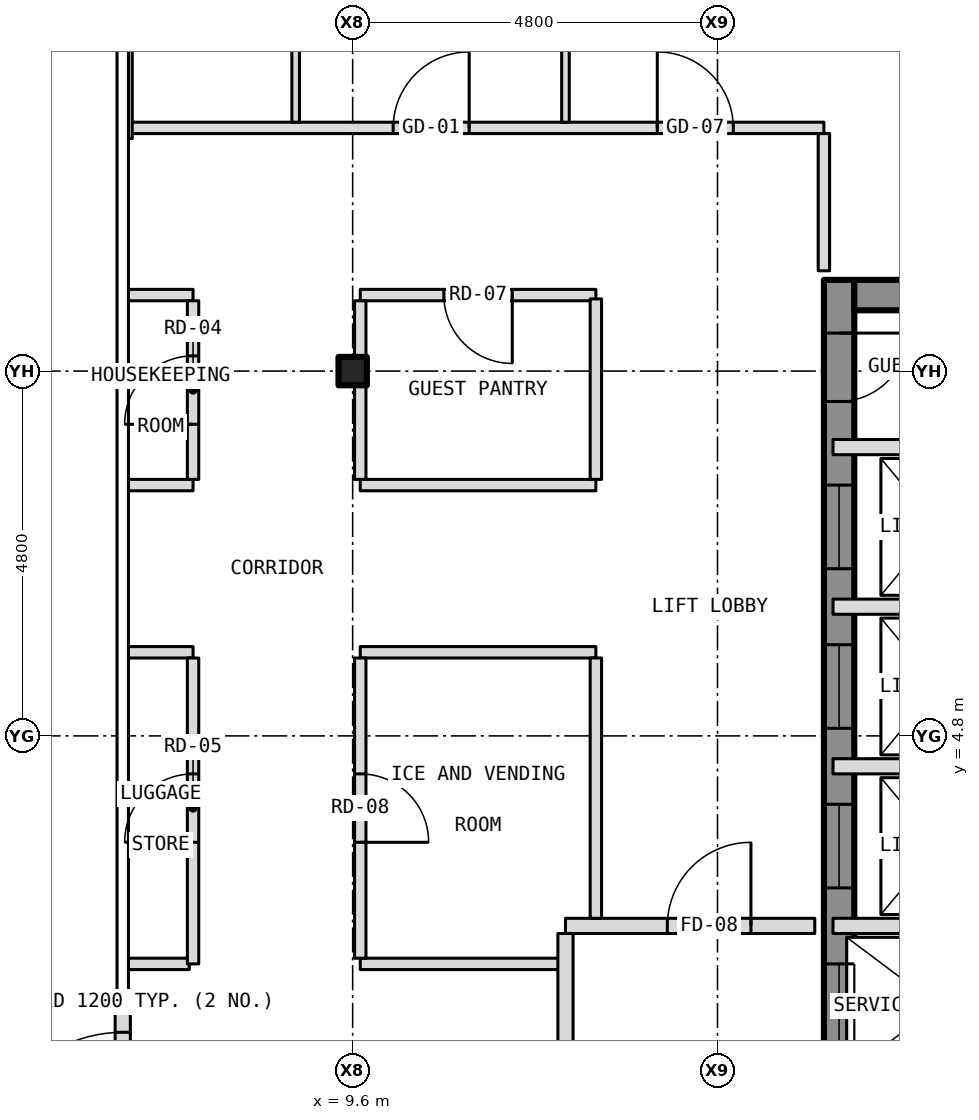
"""IFC4 building model, lengths in metres.
Left out: names, types, materials, properties, quantities, classifications, styles, units other than length and angle.
Written with IfcOpenShell. Run it as: python <this file> out.ifc"""

import sys

from ifc_helpers import new_model, si_unit, direction, frame, frame_2d, origin, origin_2d, place, context, subcontext, project, spatial, rectangle, i_section, extrude, element, fill, save


model = new_model("IFC4")
c1 = context("Model", 3, precision=1e-05, world=origin(), true_north=direction((0.0, 1.0)))
c2 = subcontext(c1, "Body", "Model", "MODEL_VIEW")
j1 = project(units=[si_unit("LENGTHUNIT", "METRE"), si_unit("PLANEANGLEUNIT", "RADIAN")], contexts=[c1])
p1 = place(None, origin())
s1 = spatial("IfcSite", under=j1, at=p1, CompositionType="ELEMENT")
p2 = place(p1, origin())
s2 = spatial("IfcBuilding", under=s1, at=p2, CompositionType="ELEMENT")
p3 = place(p2, frame((0.0, 0.0, 233.0)))
s3 = spatial("IfcBuildingStorey", under=s2, at=p3, CompositionType="ELEMENT", Elevation=233.0)
p4 = place(p3, frame((9.6, 9.6, -0.15), z_axis=(0.0, 0.0, 1.0), x_axis=(1.0, 0.0, 0.0)))
e1 = element("IfcColumn", 1, at=p4, inside=s3, PredefinedType="COLUMN", context=c2, shape_type="SweptSolid", body=[
    extrude(i_section(OverallWidth=0.373, OverallDepth=0.373, WebThickness=0.016, FlangeThickness=0.026, at=origin_2d()), origin(), (0.0, 0.0, 1.0), 3.35),
])
p5 = place(p3, frame((16.0, -10.8, 0.0), z_axis=(0.0, 0.0, 1.0), x_axis=(0.0, 1.0, 0.0)))
e2 = element("IfcWall", 2, at=p5, inside=s3, PredefinedType="SHEAR", context=c2, shape_type="SweptSolid", body=[
    extrude(rectangle(XDim=21.6, YDim=0.4, at=frame_2d((10.8, 0.0))), origin(), (0.0, 0.0, 1.0), 2.9),
])
p6 = place(p5, frame((9.4, 0.0, 0.0)))
e3 = element("IfcOpeningElement", 3, at=p6, cuts=e2, PredefinedType="OPENING", context=c2, shape_type="SweptSolid", body=[
    extrude(rectangle(XDim=1.1, YDim=2.1, at=frame_2d((0.55, 1.05))), frame((0.0, 0.212, 0.0), z_axis=(0.0, -1.0, 0.0), x_axis=(1.0, 0.0, 0.0)), (0.0, 0.0, 1.0), 0.424),
])
p7 = place(p5, frame((11.5, 0.0, 0.0)))
e4 = element("IfcOpeningElement", 4, at=p7, cuts=e2, PredefinedType="OPENING", context=c2, shape_type="SweptSolid", body=[
    extrude(rectangle(XDim=1.1, YDim=2.1, at=frame_2d((0.55, 1.05))), frame((0.0, 0.212, 0.0), z_axis=(0.0, -1.0, 0.0), x_axis=(1.0, 0.0, 0.0)), (0.0, 0.0, 1.0), 0.424),
])
p8 = place(p5, frame((13.6, 0.0, 0.0)))
e5 = element("IfcOpeningElement", 5, at=p8, cuts=e2, PredefinedType="OPENING", context=c2, shape_type="SweptSolid", body=[
    extrude(rectangle(XDim=1.1, YDim=2.1, at=frame_2d((0.55, 1.05))), frame((0.0, 0.212, 0.0), z_axis=(0.0, -1.0, 0.0), x_axis=(1.0, 0.0, 0.0)), (0.0, 0.0, 1.0), 0.424),
])
p9 = place(p5, frame((15.7, 0.0, 0.0)))
e6 = element("IfcOpeningElement", 6, at=p9, cuts=e2, PredefinedType="OPENING", context=c2, shape_type="SweptSolid", body=[
    extrude(rectangle(XDim=1.1, YDim=2.1, at=frame_2d((0.55, 1.05))), frame((0.0, 0.212, 0.0), z_axis=(0.0, -1.0, 0.0), x_axis=(1.0, 0.0, 0.0)), (0.0, 0.0, 1.0), 0.424),
])
p10 = place(p5, frame((17.8, 0.0, 0.0)))
e7 = element("IfcOpeningElement", 7, at=p10, cuts=e2, PredefinedType="OPENING", context=c2, shape_type="SweptSolid", body=[
    extrude(rectangle(XDim=1.1, YDim=2.1, at=frame_2d((0.55, 1.05))), frame((0.0, 0.212, 0.0), z_axis=(0.0, -1.0, 0.0), x_axis=(1.0, 0.0, 0.0)), (0.0, 0.0, 1.0), 0.424),
])
p11 = place(p5, frame((5.642, 0.0, 0.0)))
e8 = element("IfcOpeningElement", 8, at=p11, cuts=e2, PredefinedType="OPENING", context=c2, shape_type="SweptSolid", body=[
    extrude(rectangle(XDim=1.1, YDim=2.1, at=frame_2d((0.55, 1.05))), frame((0.0, 0.212, 0.0), z_axis=(0.0, -1.0, 0.0), x_axis=(1.0, 0.0, 0.0)), (0.0, 0.0, 1.0), 0.424),
])
p12 = place(p5, frame((7.5, 0.0, 0.0)))
e9 = element("IfcOpeningElement", 9, at=p12, cuts=e2, PredefinedType="OPENING", context=c2, shape_type="SweptSolid", body=[
    extrude(rectangle(XDim=1.1, YDim=2.1, at=frame_2d((0.55, 1.05))), frame((0.0, 0.212, 0.0), z_axis=(0.0, -1.0, 0.0), x_axis=(1.0, 0.0, 0.0)), (0.0, 0.0, 1.0), 0.424),
])
p13 = place(p5, frame((20.0, 0.0, 0.0)))
e10 = element("IfcOpeningElement", 10, at=p13, cuts=e2, PredefinedType="OPENING", context=c2, shape_type="SweptSolid", body=[
    extrude(rectangle(XDim=0.9, YDim=2.1, at=frame_2d((0.45, 1.05))), frame((0.0, 0.212, 0.0), z_axis=(0.0, -1.0, 0.0), x_axis=(1.0, 0.0, 0.0)), (0.0, 0.0, 1.0), 0.424),
])
p14 = place(p3, frame((16.2, 10.6, 0.0), z_axis=(0.0, 0.0, 1.0), x_axis=(1.0, 0.0, 0.0)))
e11 = element("IfcWall", 11, at=p14, inside=s3, PredefinedType="SHEAR", context=c2, shape_type="SweptSolid", body=[
    extrude(rectangle(XDim=3.8, YDim=0.4, at=frame_2d((1.9, 0.0))), origin(), (0.0, 0.0, 1.0), 2.9),
])
p15 = place(p3, frame((6.575, -1.4, 0.0), z_axis=(0.0, 0.0, 1.0), x_axis=(0.0, 1.0, 0.0)))
e12 = element("IfcWall", 12, at=p15, inside=s3, PredefinedType="SOLIDWALL", context=c2, shape_type="SweptSolid", body=[
    extrude(rectangle(XDim=2.8, YDim=0.2, at=frame_2d((1.4, 0.0))), origin(), (0.0, 0.0, 1.0), 3.5),
])
p16 = place(p15, frame((0.5, 0.0, 0.0)))
e13 = element("IfcOpeningElement", 13, at=p16, cuts=e12, PredefinedType="OPENING", context=c2, shape_type="SweptSolid", body=[
    extrude(rectangle(XDim=1.8, YDim=2.1, at=frame_2d((0.9, 1.05))), frame((0.0, 0.112, 0.0), z_axis=(0.0, -1.0, 0.0), x_axis=(1.0, 0.0, 0.0)), (0.0, 0.0, 1.0), 0.224),
])
p17 = place(p3, frame((6.62, 1.8, 0.0), z_axis=(0.0, 0.0, 1.0), x_axis=(1.0, 0.0, 0.0)))
e14 = element("IfcWall", 14, at=p17, inside=s3, PredefinedType="PARTITIONING", context=c2, shape_type="SweptSolid", body=[
    extrude(rectangle(XDim=0.83, YDim=0.15, at=frame_2d((0.415, 0.0))), origin(), (0.0, 0.0, 1.0), 3.2),
])
p18 = place(p3, frame((9.7, 1.8, 0.0), z_axis=(0.0, 0.0, 1.0), x_axis=(1.0, 0.0, 0.0)))
e15 = element("IfcWall", 15, at=p18, inside=s3, PredefinedType="PARTITIONING", context=c2, shape_type="SweptSolid", body=[
    extrude(rectangle(XDim=2.7, YDim=0.15, at=frame_2d((1.35, 0.0))), origin(), (0.0, 0.0, 1.0), 3.2),
])
p19 = place(p3, frame((12.4, 2.3, 0.0), z_axis=(0.0, 0.0, 1.0), x_axis=(1.0, 0.0, 0.0)))
e16 = element("IfcWall", 16, at=p19, inside=s3, PredefinedType="PARTITIONING", context=c2, shape_type="SweptSolid", body=[
    extrude(rectangle(XDim=3.28, YDim=0.2, at=frame_2d((1.64, 0.0))), origin(), (0.0, 0.0, 1.0), 3.2),
])
p20 = place(p19, frame((1.34, 0.0, 0.0)))
e17 = element("IfcOpeningElement", 17, at=p20, cuts=e16, PredefinedType="OPENING", context=c2, shape_type="SweptSolid", body=[
    extrude(rectangle(XDim=1.1, YDim=2.1, at=frame_2d((0.55, 1.05))), frame((0.0, 0.112, 0.0), z_axis=(0.0, -1.0, 0.0), x_axis=(1.0, 0.0, 0.0)), (0.0, 0.0, 1.0), 0.224),
])
for number, where, z_axis, x_axis in (
    (18, (15.92, 2.3, 0.0), (0.0, 0.0, 1.0), (1.0, 0.0, 0.0)),
    (19, (15.92, 4.4, 0.0), (0.0, 0.0, 1.0), (1.0, 0.0, 0.0)),
):
    element("IfcWall", number, at=place(p3, frame(where, z_axis=z_axis, x_axis=x_axis)), inside=s3, PredefinedType="PARTITIONING", context=c2, shape_type="SweptSolid", body=[
        extrude(rectangle(XDim=2.88, YDim=0.2, at=frame_2d((1.44, 0.0))), origin(), (0.0, 0.0, 1.0), 2.9),
    ])
p21 = place(p3, frame((6.62, 5.9, 0.0), z_axis=(0.0, 0.0, 1.0), x_axis=(1.0, 0.0, 0.0)))
e20 = element("IfcWall", 20, at=p21, inside=s3, PredefinedType="PARTITIONING", context=c2, shape_type="SweptSolid", body=[
    extrude(rectangle(XDim=0.88, YDim=0.15, at=frame_2d((0.44, 0.0))), origin(), (0.0, 0.0, 1.0), 3.2),
])
p22 = place(p3, frame((9.7, 5.9, 0.0), z_axis=(0.0, 0.0, 1.0), x_axis=(1.0, 0.0, 0.0)))
e21 = element("IfcWall", 21, at=p22, inside=s3, PredefinedType="PARTITIONING", context=c2, shape_type="SweptSolid", body=[
    extrude(rectangle(XDim=3.1, YDim=0.15, at=frame_2d((1.55, 0.0))), origin(), (0.0, 0.0, 1.0), 3.2),
])
p23 = place(p3, frame((15.92, 6.5, 0.0), z_axis=(0.0, 0.0, 1.0), x_axis=(1.0, 0.0, 0.0)))
e22 = element("IfcWall", 22, at=p23, inside=s3, PredefinedType="PARTITIONING", context=c2, shape_type="SweptSolid", body=[
    extrude(rectangle(XDim=2.88, YDim=0.2, at=frame_2d((1.44, 0.0))), origin(), (0.0, 0.0, 1.0), 2.9),
])
p24 = place(p3, frame((6.62, 8.1, 0.0), z_axis=(0.0, 0.0, 1.0), x_axis=(1.0, 0.0, 0.0)))
e23 = element("IfcWall", 23, at=p24, inside=s3, PredefinedType="PARTITIONING", context=c2, shape_type="SweptSolid", body=[
    extrude(rectangle(XDim=0.88, YDim=0.15, at=frame_2d((0.44, 0.0))), origin(), (0.0, 0.0, 1.0), 3.2),
])
p25 = place(p3, frame((9.7, 8.1, 0.0), z_axis=(0.0, 0.0, 1.0), x_axis=(1.0, 0.0, 0.0)))
e24 = element("IfcWall", 24, at=p25, inside=s3, PredefinedType="PARTITIONING", context=c2, shape_type="SweptSolid", body=[
    extrude(rectangle(XDim=3.1, YDim=0.15, at=frame_2d((1.55, 0.0))), origin(), (0.0, 0.0, 1.0), 3.2),
])
p26 = place(p3, frame((15.92, 8.6, 0.0), z_axis=(0.0, 0.0, 1.0), x_axis=(1.0, 0.0, 0.0)))
e25 = element("IfcWall", 25, at=p26, inside=s3, PredefinedType="PARTITIONING", context=c2, shape_type="SweptSolid", body=[
    extrude(rectangle(XDim=2.88, YDim=0.2, at=frame_2d((1.44, 0.0))), origin(), (0.0, 0.0, 1.0), 2.9),
])
p27 = place(p3, frame((6.62, 10.6, 0.0), z_axis=(0.0, 0.0, 1.0), x_axis=(1.0, 0.0, 0.0)))
e26 = element("IfcWall", 26, at=p27, inside=s3, PredefinedType="PARTITIONING", context=c2, shape_type="SweptSolid", body=[
    extrude(rectangle(XDim=0.88, YDim=0.15, at=frame_2d((0.44, 0.0))), origin(), (0.0, 0.0, 1.0), 3.2),
])
p28 = place(p3, frame((9.7, 10.6, 0.0), z_axis=(0.0, 0.0, 1.0), x_axis=(1.0, 0.0, 0.0)))
e27 = element("IfcWall", 27, at=p28, inside=s3, PredefinedType="PARTITIONING", context=c2, shape_type="SweptSolid", body=[
    extrude(rectangle(XDim=3.1, YDim=0.15, at=frame_2d((1.55, 0.0))), origin(), (0.0, 0.0, 1.0), 3.2),
])
p29 = place(p28, frame((1.1, 0.0, 0.0)))
e28 = element("IfcOpeningElement", 28, at=p29, cuts=e27, PredefinedType="OPENING", context=c2, shape_type="SweptSolid", body=[
    extrude(rectangle(XDim=0.9, YDim=2.1, at=frame_2d((0.45, 1.05))), frame((0.0, 0.087, 0.0), z_axis=(0.0, -1.0, 0.0), x_axis=(1.0, 0.0, 0.0)), (0.0, 0.0, 1.0), 0.174),
])
p30 = place(p3, frame((6.65, 12.8, 0.0), z_axis=(0.0, 0.0, 1.0), x_axis=(1.0, 0.0, 0.0)))
e29 = element("IfcWall", 29, at=p30, inside=s3, PredefinedType="PARTITIONING", context=c2, shape_type="SweptSolid", body=[
    extrude(rectangle(XDim=9.15, YDim=0.15, at=frame_2d((4.575, 0.0))), origin(), (0.0, 0.0, 1.0), 3.2),
])
p31 = place(p30, frame((3.483, 0.0, 0.0)))
e30 = element("IfcOpeningElement", 30, at=p31, cuts=e29, PredefinedType="OPENING", context=c2, shape_type="SweptSolid", body=[
    extrude(rectangle(XDim=1.0, YDim=2.1, at=frame_2d((0.5, 1.05))), frame((0.0, 0.087, 0.0), z_axis=(0.0, -1.0, 0.0), x_axis=(1.0, 0.0, 0.0)), (0.0, 0.0, 1.0), 0.174),
])
p32 = place(p30, frame((6.958, 0.0, 0.0)))
e31 = element("IfcOpeningElement", 31, at=p32, cuts=e29, PredefinedType="OPENING", context=c2, shape_type="SweptSolid", body=[
    extrude(rectangle(XDim=1.0, YDim=2.1, at=frame_2d((0.5, 1.05))), frame((0.0, 0.087, 0.0), z_axis=(0.0, -1.0, 0.0), x_axis=(1.0, 0.0, 0.0)), (0.0, 0.0, 1.0), 0.174),
])
p33 = place(p3, frame((6.65, 12.66, 0.0), z_axis=(0.0, 0.0, 1.0), x_axis=(0.0, 1.0, 0.0)))
e32 = element("IfcWall", 32, at=p33, inside=s3, PredefinedType="PARTITIONING", context=c2, shape_type="SweptSolid", body=[
    extrude(rectangle(XDim=3.48, YDim=0.1, at=frame_2d((1.74, 0.0))), origin(), (0.0, 0.0, 1.0), 3.2),
])
p34 = place(p3, frame((7.5, 1.8, 0.0), z_axis=(0.0, 0.0, 1.0), x_axis=(0.0, 1.0, 0.0)))
e33 = element("IfcWall", 33, at=p34, inside=s3, PredefinedType="PARTITIONING", context=c2, shape_type="SweptSolid", body=[
    extrude(rectangle(XDim=4.025, YDim=0.15, at=frame_2d((2.012, 0.0))), origin(), (0.0, 0.0, 1.0), 3.2),
])
p35 = place(p34, frame((1.6, 0.0, 0.0)))
e34 = element("IfcOpeningElement", 34, at=p35, cuts=e33, PredefinedType="OPENING", context=c2, shape_type="SweptSolid", body=[
    extrude(rectangle(XDim=0.9, YDim=2.1, at=frame_2d((0.45, 1.05))), frame((0.0, 0.087, 0.0), z_axis=(0.0, -1.0, 0.0), x_axis=(1.0, 0.0, 0.0)), (0.0, 0.0, 1.0), 0.174),
])
p36 = place(p3, frame((7.5, 8.175, 0.0), z_axis=(0.0, 0.0, 1.0), x_axis=(0.0, 1.0, 0.0)))
e35 = element("IfcWall", 35, at=p36, inside=s3, PredefinedType="PARTITIONING", context=c2, shape_type="SweptSolid", body=[
    extrude(rectangle(XDim=2.35, YDim=0.15, at=frame_2d((1.175, 0.0))), origin(), (0.0, 0.0, 1.0), 3.2),
])
p37 = place(p36, frame((0.725, 0.0, 0.0)))
e36 = element("IfcOpeningElement", 36, at=p37, cuts=e35, PredefinedType="OPENING", context=c2, shape_type="SweptSolid", body=[
    extrude(rectangle(XDim=0.9, YDim=2.1, at=frame_2d((0.45, 1.05))), frame((0.0, 0.087, 0.0), z_axis=(0.0, -1.0, 0.0), x_axis=(1.0, 0.0, 0.0)), (0.0, 0.0, 1.0), 0.174),
])
p38 = place(p3, frame((8.85, 12.875, 0.0), z_axis=(0.0, 0.0, 1.0), x_axis=(0.0, 1.0, 0.0)))
e37 = element("IfcWall", 37, at=p38, inside=s3, PredefinedType="PARTITIONING", context=c2, shape_type="SweptSolid", body=[
    extrude(rectangle(XDim=3.075, YDim=0.1, at=frame_2d((1.538, 0.0))), origin(), (0.0, 0.0, 1.0), 3.2),
])
p39 = place(p38, frame((1.971, 0.0, 0.0)))
e38 = element("IfcOpeningElement", 38, at=p39, cuts=e37, PredefinedType="OPENING", context=c2, shape_type="SweptSolid", body=[
    extrude(rectangle(XDim=0.9, YDim=2.1, at=frame_2d((0.45, 1.05))), frame((0.0, 0.062, 0.0), z_axis=(0.0, -1.0, 0.0), x_axis=(1.0, 0.0, 0.0)), (0.0, 0.0, 1.0), 0.124),
])
p40 = place(p3, frame((9.7, 1.875, 0.0), z_axis=(0.0, 0.0, 1.0), x_axis=(0.0, 1.0, 0.0)))
e39 = element("IfcWall", 39, at=p40, inside=s3, PredefinedType="PARTITIONING", context=c2, shape_type="SweptSolid", body=[
    extrude(rectangle(XDim=3.95, YDim=0.15, at=frame_2d((1.975, 0.0))), origin(), (0.0, 0.0, 1.0), 2.578),
])
p41 = place(p40, frame((1.525, 0.0, 0.0)))
e40 = element("IfcOpeningElement", 40, at=p41, cuts=e39, PredefinedType="OPENING", context=c2, shape_type="SweptSolid", body=[
    extrude(rectangle(XDim=0.9, YDim=2.1, at=frame_2d((0.45, 1.05))), frame((0.0, 0.087, 0.0), z_axis=(0.0, -1.0, 0.0), x_axis=(1.0, 0.0, 0.0)), (0.0, 0.0, 1.0), 0.174),
])
p42 = place(p3, frame((9.7, 8.175, 0.0), z_axis=(0.0, 0.0, 1.0), x_axis=(0.0, 1.0, 0.0)))
e41 = element("IfcWall", 41, at=p42, inside=s3, PredefinedType="PARTITIONING", context=c2, shape_type="SweptSolid", body=[
    extrude(rectangle(XDim=1.224, YDim=0.15, at=frame_2d((0.612, 0.0))), origin(), (0.0, 0.0, 1.0), 2.578),
])
p43 = place(p3, frame((9.7, 9.399, 0.0), z_axis=(0.0, 0.0, 1.0), x_axis=(0.0, 1.0, 0.0)))
e42 = element("IfcWall", 42, at=p43, inside=s3, PredefinedType="PARTITIONING", context=c2, shape_type="SweptSolid", body=[
    extrude(rectangle(XDim=0.401, YDim=0.15, at=frame_2d((0.201, 0.0))), origin(), (0.0, 0.0, 1.0), 3.2),
])
p44 = place(p3, frame((9.7, 9.8, 0.0), z_axis=(0.0, 0.0, 1.0), x_axis=(0.0, 1.0, 0.0)))
e43 = element("IfcWall", 43, at=p44, inside=s3, PredefinedType="PARTITIONING", context=c2, shape_type="SweptSolid", body=[
    extrude(rectangle(XDim=0.725, YDim=0.15, at=frame_2d((0.362, 0.0))), origin(), (0.0, 0.0, 1.0), 2.578),
])
p45 = place(p3, frame((12.4, -1.8, 0.0), z_axis=(0.0, 0.0, 1.0), x_axis=(0.0, 1.0, 0.0)))
e44 = element("IfcWall", 44, at=p45, inside=s3, PredefinedType="PARTITIONING", context=c2, shape_type="SweptSolid", body=[
    extrude(rectangle(XDim=4.0, YDim=0.2, at=frame_2d((2.0, 0.0))), origin(), (0.0, 0.0, 1.0), 3.2),
])
p46 = place(p45, frame((1.25, 0.0, 0.0)))
e45 = element("IfcOpeningElement", 45, at=p46, cuts=e44, PredefinedType="OPENING", context=c2, shape_type="SweptSolid", body=[
    extrude(rectangle(XDim=1.1, YDim=2.1, at=frame_2d((0.55, 1.05))), frame((0.0, 0.112, 0.0), z_axis=(0.0, -1.0, 0.0), x_axis=(1.0, 0.0, 0.0)), (0.0, 0.0, 1.0), 0.224),
])
p47 = place(p3, frame((12.4, 12.875, 0.0), z_axis=(0.0, 0.0, 1.0), x_axis=(0.0, 1.0, 0.0)))
e46 = element("IfcWall", 46, at=p47, inside=s3, PredefinedType="PARTITIONING", context=c2, shape_type="SweptSolid", body=[
    extrude(rectangle(XDim=7.905, YDim=0.1, at=frame_2d((3.953, 0.0))), origin(), (0.0, 0.0, 1.0), 3.2),
])
p48 = place(p3, frame((12.8, 2.4, 0.0), z_axis=(0.0, 0.0, 1.0), x_axis=(0.0, 1.0, 0.0)))
e47 = element("IfcWall", 47, at=p48, inside=s3, PredefinedType="PARTITIONING", context=c2, shape_type="SweptSolid", body=[
    extrude(rectangle(XDim=3.425, YDim=0.15, at=frame_2d((1.712, 0.0))), origin(), (0.0, 0.0, 1.0), 3.2),
])
p49 = place(p3, frame((12.8, 8.175, 0.0), z_axis=(0.0, 0.0, 1.0), x_axis=(0.0, 1.0, 0.0)))
e48 = element("IfcWall", 48, at=p49, inside=s3, PredefinedType="PARTITIONING", context=c2, shape_type="SweptSolid", body=[
    extrude(rectangle(XDim=2.375, YDim=0.15, at=frame_2d((1.188, 0.0))), origin(), (0.0, 0.0, 1.0), 3.2),
])
p50 = place(p3, frame((15.8, 10.92, 0.0), z_axis=(0.0, 0.0, 1.0), x_axis=(0.0, 1.0, 0.0)))
e49 = element("IfcWall", 49, at=p50, inside=s3, PredefinedType="PARTITIONING", context=c2, shape_type="SweptSolid", body=[
    extrude(rectangle(XDim=1.805, YDim=0.15, at=frame_2d((0.903, 0.0))), origin(), (0.0, 0.0, 1.0), 3.2),
])
p51 = place(p16, origin())
e50 = element("IfcDoor", 50, at=p51, inside=s3, OperationType="DOUBLE_DOOR_DOUBLE_SWING", PredefinedType="DOOR", context=c2, shape_type="SweptSolid", body=[
    extrude(rectangle(XDim=1.8, YDim=2.1, at=frame_2d((0.9, 1.05))), frame((0.0, 0.025, 0.0), z_axis=(0.0, -1.0, 0.0), x_axis=(1.0, 0.0, 0.0)), (0.0, 0.0, 1.0), 0.05),
])
fill(e13, e50)
p52 = place(p7, origin())
e51 = element("IfcDoor", 51, at=p52, inside=s3, OperationType="SLIDING_TO_LEFT", PredefinedType="DOOR", context=c2, shape_type="SweptSolid", body=[
    extrude(rectangle(XDim=1.1, YDim=2.1, at=frame_2d((0.55, 1.05))), frame((0.0, 0.025, 0.0), z_axis=(0.0, -1.0, 0.0), x_axis=(1.0, 0.0, 0.0)), (0.0, 0.0, 1.0), 0.05),
])
fill(e4, e51)
p53 = place(p8, origin())
e52 = element("IfcDoor", 52, at=p53, inside=s3, OperationType="SLIDING_TO_LEFT", PredefinedType="DOOR", context=c2, shape_type="SweptSolid", body=[
    extrude(rectangle(XDim=1.1, YDim=2.1, at=frame_2d((0.55, 1.05))), frame((0.0, 0.025, 0.0), z_axis=(0.0, -1.0, 0.0), x_axis=(1.0, 0.0, 0.0)), (0.0, 0.0, 1.0), 0.05),
])
fill(e5, e52)
p54 = place(p9, origin())
e53 = element("IfcDoor", 53, at=p54, inside=s3, OperationType="SLIDING_TO_LEFT", PredefinedType="DOOR", context=c2, shape_type="SweptSolid", body=[
    extrude(rectangle(XDim=1.1, YDim=2.1, at=frame_2d((0.55, 1.05))), frame((0.0, 0.025, 0.0), z_axis=(0.0, -1.0, 0.0), x_axis=(1.0, 0.0, 0.0)), (0.0, 0.0, 1.0), 0.05),
])
fill(e6, e53)
p55 = place(p10, origin())
e54 = element("IfcDoor", 54, at=p55, inside=s3, OperationType="SLIDING_TO_LEFT", PredefinedType="DOOR", context=c2, shape_type="SweptSolid", body=[
    extrude(rectangle(XDim=1.1, YDim=2.1, at=frame_2d((0.55, 1.05))), frame((0.0, 0.025, 0.0), z_axis=(0.0, -1.0, 0.0), x_axis=(1.0, 0.0, 0.0)), (0.0, 0.0, 1.0), 0.05),
])
fill(e7, e54)
p56 = place(p13, origin())
e55 = element("IfcDoor", 55, at=p56, inside=s3, OperationType="SINGLE_SWING_RIGHT", PredefinedType="DOOR", context=c2, shape_type="SweptSolid", body=[
    extrude(rectangle(XDim=0.9, YDim=2.1, at=frame_2d((0.45, 1.05))), frame((0.0, 0.025, 0.0), z_axis=(0.0, -1.0, 0.0), x_axis=(1.0, 0.0, 0.0)), (0.0, 0.0, 1.0), 0.05),
])
fill(e10, e55)
p57 = place(p20, origin())
e56 = element("IfcDoor", 56, at=p57, inside=s3, OperationType="SINGLE_SWING_RIGHT", PredefinedType="DOOR", context=c2, shape_type="SweptSolid", body=[
    extrude(rectangle(XDim=1.1, YDim=2.1, at=frame_2d((0.55, 1.05))), frame((0.0, 0.025, 0.0), z_axis=(0.0, -1.0, 0.0), x_axis=(1.0, 0.0, 0.0)), (0.0, 0.0, 1.0), 0.05),
])
fill(e17, e56)
p58 = place(p31, origin())
e57 = element("IfcDoor", 57, at=p58, inside=s3, OperationType="SINGLE_SWING_RIGHT", PredefinedType="DOOR", context=c2, shape_type="SweptSolid", body=[
    extrude(rectangle(XDim=1.0, YDim=2.1, at=frame_2d((0.5, 1.05))), frame((0.0, 0.025, 0.0), z_axis=(0.0, -1.0, 0.0), x_axis=(1.0, 0.0, 0.0)), (0.0, 0.0, 1.0), 0.05),
])
fill(e30, e57)
p59 = place(p32, origin())
e58 = element("IfcDoor", 58, at=p59, inside=s3, OperationType="SINGLE_SWING_LEFT", PredefinedType="DOOR", context=c2, shape_type="SweptSolid", body=[
    extrude(rectangle(XDim=1.0, YDim=2.1, at=frame_2d((0.5, 1.05))), frame((0.0, 0.025, 0.0), z_axis=(0.0, -1.0, 0.0), x_axis=(1.0, 0.0, 0.0)), (0.0, 0.0, 1.0), 0.05),
])
fill(e31, e58)
p60 = place(p37, origin())
e59 = element("IfcDoor", 59, at=p60, inside=s3, OperationType="SINGLE_SWING_LEFT", PredefinedType="DOOR", context=c2, shape_type="SweptSolid", body=[
    extrude(rectangle(XDim=0.9, YDim=2.1, at=frame_2d((0.45, 1.05))), frame((0.0, 0.025, 0.0), z_axis=(0.0, -1.0, 0.0), x_axis=(1.0, 0.0, 0.0)), (0.0, 0.0, 1.0), 0.05),
])
fill(e36, e59)
p61 = place(p35, origin())
e60 = element("IfcDoor", 60, at=p61, inside=s3, OperationType="SINGLE_SWING_LEFT", PredefinedType="DOOR", context=c2, shape_type="SweptSolid", body=[
    extrude(rectangle(XDim=0.9, YDim=2.1, at=frame_2d((0.45, 1.05))), frame((0.0, 0.025, 0.0), z_axis=(0.0, -1.0, 0.0), x_axis=(1.0, 0.0, 0.0)), (0.0, 0.0, 1.0), 0.05),
])
fill(e34, e60)
p62 = place(p29, origin())
e61 = element("IfcDoor", 61, at=p62, inside=s3, OperationType="SINGLE_SWING_RIGHT", PredefinedType="DOOR", context=c2, shape_type="SweptSolid", body=[
    extrude(rectangle(XDim=0.9, YDim=2.1, at=frame_2d((0.45, 1.05))), frame((0.0, 0.025, 0.0), z_axis=(0.0, -1.0, 0.0), x_axis=(1.0, 0.0, 0.0)), (0.0, 0.0, 1.0), 0.05),
])
fill(e28, e61)
p63 = place(p41, origin())
e62 = element("IfcDoor", 62, at=p63, inside=s3, OperationType="SINGLE_SWING_LEFT", PredefinedType="DOOR", context=c2, shape_type="SweptSolid", body=[
    extrude(rectangle(XDim=0.9, YDim=2.1, at=frame_2d((0.45, 1.05))), frame((0.0, 0.025, 0.0), z_axis=(0.0, -1.0, 0.0), x_axis=(1.0, 0.0, 0.0)), (0.0, 0.0, 1.0), 0.05),
])
fill(e40, e62)
save(model, sys.argv[1])
